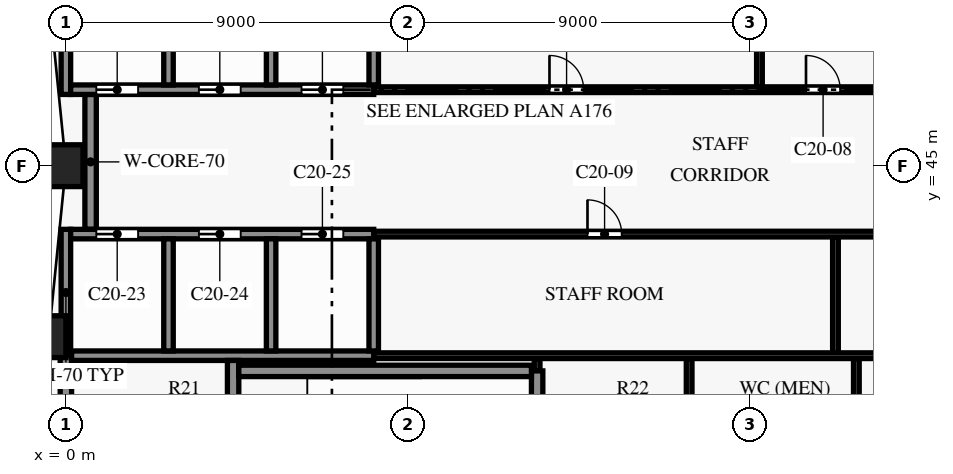
"""IFC4 building model, lengths in metres.
Left out: names, types, materials, properties, quantities, classifications, styles, units other than length and angle.
Written with IfcOpenShell. Run it as: python <this file> out.ifc"""

import sys

from ifc_helpers import new_model, si_unit, direction, frame, frame_2d, origin, origin_2d, place, context, subcontext, project, spatial, rectangle, extrude, element, fill, save


model = new_model("IFC4")
c1 = context("Model", 3, precision=1e-05, world=origin(), true_north=direction((0.0, 1.0)))
c2 = subcontext(c1, "Body", "Model", "MODEL_VIEW")
j1 = project(units=[si_unit("LENGTHUNIT", "METRE"), si_unit("PLANEANGLEUNIT", "RADIAN")], contexts=[c1])
p1 = place(None, origin())
s1 = spatial("IfcSite", under=j1, at=p1, CompositionType="ELEMENT")
p2 = place(p1, origin())
s2 = spatial("IfcBuilding", under=s1, at=p2, CompositionType="ELEMENT")
p3 = place(p2, frame((0.0, 0.0, 143.4)))
s3 = spatial("IfcBuildingStorey", under=s2, at=p3, CompositionType="ELEMENT", Elevation=143.4)
for number, where, z_axis, x_axis in (
    (1, (0.0, 45.0, 0.0), (0.0, 0.0, 1.0), (0.0, -1.0, 0.0)),
    (2, (-0.45, 40.5, 0.0), (0.0, 0.0, 1.0), (-0.1, -0.995, 0.0)),
):
    element("IfcColumn", number, at=place(p3, frame(where, z_axis=z_axis, x_axis=x_axis)), inside=s3, PredefinedType="COLUMN", context=c2, shape_type="SweptSolid", body=[
        extrude(rectangle(XDim=0.9, YDim=1.1, at=origin_2d()), origin(), (0.0, 0.0, 1.0), 3.8),
    ])
p4 = place(p3, frame((4.55, 39.6, 0.0), z_axis=(0.0, 0.0, 1.0), x_axis=(1.0, 0.0, 0.0)))
e3 = element("IfcWall", 3, at=p4, inside=s3, PredefinedType="SHEAR", context=c2, shape_type="SweptSolid", body=[
    extrude(rectangle(XDim=7.7, YDim=0.3, at=frame_2d((3.85, 0.0))), origin(), (0.0, 0.0, 1.0), 3.5),
])
p5 = place(p3, frame((8.1, 40.0, 0.0), z_axis=(0.0, 0.0, 1.0), x_axis=(1.0, 0.0, 0.0)))
e4 = element("IfcWall", 4, at=p5, inside=s3, PredefinedType="PARTITIONING", context=c2, shape_type="SweptSolid", body=[
    extrude(rectangle(XDim=16.125, YDim=0.15, at=frame_2d((8.062, 0.0))), origin(), (0.0, 0.0, 1.0), 3.5),
])
p6 = place(p3, frame((0.15, 40.0, 0.0), z_axis=(0.0, 0.0, 1.0), x_axis=(1.0, 0.0, 0.0)))
e5 = element("IfcWall", 5, at=p6, inside=s3, PredefinedType="SHEAR", context=c2, shape_type="SweptSolid", body=[
    extrude(rectangle(XDim=7.95, YDim=0.25, at=frame_2d((3.975, 0.0))), origin(), (0.0, 0.0, 1.0), 3.5),
])
p7 = place(p3, frame((8.1, 43.2, 0.0), z_axis=(0.0, 0.0, 1.0), x_axis=(1.0, 0.0, 0.0)))
e6 = element("IfcWall", 6, at=p7, inside=s3, PredefinedType="PARTITIONING", context=c2, shape_type="SweptSolid", body=[
    extrude(rectangle(XDim=16.125, YDim=0.15, at=frame_2d((8.062, 0.0))), origin(), (0.0, 0.0, 1.0), 3.5),
])
p8 = place(p7, frame((5.625, 0.0, 0.0)))
e7 = element("IfcOpeningElement", 7, at=p8, cuts=e6, PredefinedType="OPENING", context=c2, shape_type="SweptSolid", body=[
    extrude(rectangle(XDim=0.9, YDim=2.1, at=frame_2d((0.45, 1.05))), frame((0.0, 0.085, 0.0), z_axis=(0.0, -1.0, 0.0), x_axis=(1.0, 0.0, 0.0)), (0.0, 0.0, 1.0), 0.17),
])
p9 = place(p7, frame((13.725, 0.0, 0.0)))
e8 = element("IfcOpeningElement", 8, at=p9, cuts=e6, PredefinedType="OPENING", context=c2, shape_type="SweptSolid", body=[
    extrude(rectangle(XDim=0.9, YDim=2.1, at=frame_2d((0.45, 1.05))), frame((0.0, 0.085, 0.0), z_axis=(0.0, -1.0, 0.0), x_axis=(1.0, 0.0, 0.0)), (0.0, 0.0, 1.0), 0.17),
])
p10 = place(p3, frame((0.125, 43.2, 0.0), z_axis=(0.0, 0.0, 1.0), x_axis=(1.0, 0.0, 0.0)))
e9 = element("IfcWall", 9, at=p10, inside=s3, PredefinedType="SHEAR", context=c2, shape_type="SweptSolid", body=[
    extrude(rectangle(XDim=7.975, YDim=0.25, at=frame_2d((3.988, 0.0))), origin(), (0.0, 0.0, 1.0), 3.5),
])
p11 = place(p10, frame((0.675, 0.0, 0.0)))
e10 = element("IfcOpeningElement", 10, at=p11, cuts=e9, PredefinedType="OPENING", context=c2, shape_type="SweptSolid", body=[
    extrude(rectangle(XDim=1.1, YDim=2.1, at=frame_2d((0.55, 1.05))), frame((0.0, 0.135, 0.0), z_axis=(0.0, -1.0, 0.0), x_axis=(1.0, 0.0, 0.0)), (0.0, 0.0, 1.0), 0.27),
])
p12 = place(p10, frame((3.375, 0.0, 0.0)))
e11 = element("IfcOpeningElement", 11, at=p12, cuts=e9, PredefinedType="OPENING", context=c2, shape_type="SweptSolid", body=[
    extrude(rectangle(XDim=1.1, YDim=2.1, at=frame_2d((0.55, 1.05))), frame((0.0, 0.135, 0.0), z_axis=(0.0, -1.0, 0.0), x_axis=(1.0, 0.0, 0.0)), (0.0, 0.0, 1.0), 0.27),
])
p13 = place(p10, frame((6.075, 0.0, 0.0)))
e12 = element("IfcOpeningElement", 12, at=p13, cuts=e9, PredefinedType="OPENING", context=c2, shape_type="SweptSolid", body=[
    extrude(rectangle(XDim=1.1, YDim=2.1, at=frame_2d((0.55, 1.05))), frame((0.0, 0.135, 0.0), z_axis=(0.0, -1.0, 0.0), x_axis=(1.0, 0.0, 0.0)), (0.0, 0.0, 1.0), 0.27),
])
p14 = place(p3, frame((8.1, 47.0, 0.0), z_axis=(0.0, 0.0, 1.0), x_axis=(1.0, 0.0, 0.0)))
e13 = element("IfcWall", 13, at=p14, inside=s3, PredefinedType="PARTITIONING", context=c2, shape_type="SweptSolid", body=[
    extrude(rectangle(XDim=13.5, YDim=0.15, at=frame_2d((6.75, 0.0))), origin(), (0.0, 0.0, 1.0), 3.5),
])
p15 = place(p14, frame((4.625, 0.0, 0.0)))
e14 = element("IfcOpeningElement", 14, at=p15, cuts=e13, PredefinedType="OPENING", context=c2, shape_type="SweptSolid", body=[
    extrude(rectangle(XDim=0.9, YDim=2.1, at=frame_2d((0.45, 1.05))), frame((0.0, 0.085, 0.0), z_axis=(0.0, -1.0, 0.0), x_axis=(1.0, 0.0, 0.0)), (0.0, 0.0, 1.0), 0.17),
])
p16 = place(p14, frame((11.375, 0.0, 0.0)))
e15 = element("IfcOpeningElement", 15, at=p16, cuts=e13, PredefinedType="OPENING", context=c2, shape_type="SweptSolid", body=[
    extrude(rectangle(XDim=0.9, YDim=2.1, at=frame_2d((0.45, 1.05))), frame((0.0, 0.085, 0.0), z_axis=(0.0, -1.0, 0.0), x_axis=(1.0, 0.0, 0.0)), (0.0, 0.0, 1.0), 0.17),
])
p17 = place(p3, frame((0.125, 47.0, 0.0), z_axis=(0.0, 0.0, 1.0), x_axis=(1.0, 0.0, 0.0)))
e16 = element("IfcWall", 16, at=p17, inside=s3, PredefinedType="SHEAR", context=c2, shape_type="SweptSolid", body=[
    extrude(rectangle(XDim=7.975, YDim=0.25, at=frame_2d((3.988, 0.0))), origin(), (0.0, 0.0, 1.0), 3.5),
])
p18 = place(p17, frame((0.675, 0.0, 0.0)))
e17 = element("IfcOpeningElement", 17, at=p18, cuts=e16, PredefinedType="OPENING", context=c2, shape_type="SweptSolid", body=[
    extrude(rectangle(XDim=1.1, YDim=2.1, at=frame_2d((0.55, 1.05))), frame((0.0, 0.135, 0.0), z_axis=(0.0, -1.0, 0.0), x_axis=(1.0, 0.0, 0.0)), (0.0, 0.0, 1.0), 0.27),
])
p19 = place(p17, frame((3.375, 0.0, 0.0)))
e18 = element("IfcOpeningElement", 18, at=p19, cuts=e16, PredefinedType="OPENING", context=c2, shape_type="SweptSolid", body=[
    extrude(rectangle(XDim=1.1, YDim=2.1, at=frame_2d((0.55, 1.05))), frame((0.0, 0.135, 0.0), z_axis=(0.0, -1.0, 0.0), x_axis=(1.0, 0.0, 0.0)), (0.0, 0.0, 1.0), 0.27),
])
p20 = place(p17, frame((6.075, 0.0, 0.0)))
e19 = element("IfcOpeningElement", 19, at=p20, cuts=e16, PredefinedType="OPENING", context=c2, shape_type="SweptSolid", body=[
    extrude(rectangle(XDim=1.1, YDim=2.1, at=frame_2d((0.55, 1.05))), frame((0.0, 0.135, 0.0), z_axis=(0.0, -1.0, 0.0), x_axis=(1.0, 0.0, 0.0)), (0.0, 0.0, 1.0), 0.27),
])
p21 = place(p3, frame((0.0, 35.925, 0.0), z_axis=(0.0, 0.0, 1.0), x_axis=(0.0, 1.0, 0.0)))
e20 = element("IfcWall", 20, at=p21, inside=s3, PredefinedType="SHEAR", context=c2, shape_type="SweptSolid", body=[
    extrude(rectangle(XDim=4.075, YDim=0.3, at=frame_2d((2.038, 0.0))), origin(), (0.0, 0.0, 1.0), 3.5),
])
p22 = place(p3, frame((0.0, 40.0, 0.0), z_axis=(0.0, 0.0, 1.0), x_axis=(0.0, 1.0, 0.0)))
e21 = element("IfcWall", 21, at=p22, inside=s3, PredefinedType="SHEAR", context=c2, shape_type="SweptSolid", body=[
    extrude(rectangle(XDim=3.325, YDim=0.25, at=frame_2d((1.663, 0.0))), origin(), (0.0, 0.0, 1.0), 3.5),
])
p23 = place(p3, frame((0.0, 46.875, 0.0), z_axis=(0.0, 0.0, 1.0), x_axis=(0.0, 1.0, 0.0)))
e22 = element("IfcWall", 22, at=p23, inside=s3, PredefinedType="SHEAR", context=c2, shape_type="SweptSolid", body=[
    extrude(rectangle(XDim=3.475, YDim=0.25, at=frame_2d((1.738, 0.0))), origin(), (0.0, 0.0, 1.0), 3.5),
])
p24 = place(p3, frame((0.65, 43.325, 0.0), z_axis=(0.0, 0.0, 1.0), x_axis=(0.0, 1.0, 0.0)))
e23 = element("IfcWall", 23, at=p24, inside=s3, PredefinedType="SHEAR", context=c2, shape_type="SweptSolid", body=[
    extrude(rectangle(XDim=3.55, YDim=0.3, at=frame_2d((1.775, 0.0))), origin(), (0.0, 0.0, 1.0), 3.5),
])
for number, where, z_axis, x_axis in (
    (24, (2.7, 40.125, 0.0), (0.0, 0.0, 1.0), (0.0, 1.0, 0.0)),
    (25, (2.7, 47.125, 0.0), (0.0, 0.0, 1.0), (0.0, 1.0, 0.0)),
):
    element("IfcWall", number, at=place(p3, frame(where, z_axis=z_axis, x_axis=x_axis)), inside=s3, PredefinedType="SHEAR", context=c2, shape_type="SweptSolid", body=[
        extrude(rectangle(XDim=2.95, YDim=0.25, at=frame_2d((1.475, 0.0))), origin(), (0.0, 0.0, 1.0), 3.5),
    ])
p25 = place(p3, frame((4.4, 36.15, 0.0), z_axis=(0.0, 0.0, 1.0), x_axis=(0.0, 1.0, 0.0)))
e26 = element("IfcWall", 26, at=p25, inside=s3, PredefinedType="SHEAR", context=c2, shape_type="SweptSolid", body=[
    extrude(rectangle(XDim=3.725, YDim=0.3, at=frame_2d((1.863, 0.0))), origin(), (0.0, 0.0, 1.0), 3.5),
])
for number, where, z_axis, x_axis in (
    (27, (5.4, 40.125, 0.0), (0.0, 0.0, 1.0), (0.0, 1.0, 0.0)),
    (28, (5.4, 47.125, 0.0), (0.0, 0.0, 1.0), (0.0, 1.0, 0.0)),
    (29, (8.1, 40.125, 0.0), (0.0, 0.0, 1.0), (0.0, 1.0, 0.0)),
):
    element("IfcWall", number, at=place(p3, frame(where, z_axis=z_axis, x_axis=x_axis)), inside=s3, PredefinedType="SHEAR", context=c2, shape_type="SweptSolid", body=[
        extrude(rectangle(XDim=2.95, YDim=0.25, at=frame_2d((1.475, 0.0))), origin(), (0.0, 0.0, 1.0), 3.5),
    ])
p26 = place(p3, frame((8.1, 47.125, 0.0), z_axis=(0.0, 0.0, 1.0), x_axis=(0.0, 1.0, 0.0)))
e30 = element("IfcWall", 30, at=p26, inside=s3, PredefinedType="SHEAR", context=c2, shape_type="SweptSolid", body=[
    extrude(rectangle(XDim=3.075, YDim=0.25, at=frame_2d((1.538, 0.0))), origin(), (0.0, 0.0, 1.0), 3.5),
])
p27 = place(p3, frame((12.4, 39.6, 0.0), z_axis=(0.0, 0.0, 1.0), x_axis=(0.0, 1.0, 0.0)))
e31 = element("IfcWall", 31, at=p27, inside=s3, PredefinedType="PARTITIONING", context=c2, shape_type="SweptSolid", body=[
    extrude(rectangle(XDim=0.325, YDim=0.15, at=frame_2d((0.163, 0.0))), origin(), (0.0, 0.0, 1.0), 3.5),
])
p28 = place(p3, frame((12.4, 36.15, 0.0), z_axis=(0.0, 0.0, 1.0), x_axis=(0.0, 1.0, 0.0)))
e32 = element("IfcWall", 32, at=p28, inside=s3, PredefinedType="SHEAR", context=c2, shape_type="SweptSolid", body=[
    extrude(rectangle(XDim=3.45, YDim=0.3, at=frame_2d((1.725, 0.0))), origin(), (0.0, 0.0, 1.0), 3.5),
])
p29 = place(p3, frame((16.4, 36.075, 0.0), z_axis=(0.0, 0.0, 1.0), x_axis=(0.0, 1.0, 0.0)))
e33 = element("IfcWall", 33, at=p29, inside=s3, PredefinedType="PARTITIONING", context=c2, shape_type="SweptSolid", body=[
    extrude(rectangle(XDim=3.85, YDim=0.15, at=frame_2d((1.925, 0.0))), origin(), (0.0, 0.0, 1.0), 3.5),
])
p30 = place(p3, frame((18.25, 47.075, 0.0), z_axis=(0.0, 0.0, 1.0), x_axis=(0.0, 1.0, 0.0)))
e34 = element("IfcWall", 34, at=p30, inside=s3, PredefinedType="PARTITIONING", context=c2, shape_type="SweptSolid", body=[
    extrude(rectangle(XDim=4.65, YDim=0.15, at=frame_2d((2.325, 0.0))), origin(), (0.0, 0.0, 1.0), 3.5),
])
p31 = place(p3, frame((20.25, 40.075, 0.0), z_axis=(0.0, 0.0, 1.0), x_axis=(0.0, 1.0, 0.0)))
e35 = element("IfcWall", 35, at=p31, inside=s3, PredefinedType="PARTITIONING", context=c2, shape_type="SweptSolid", body=[
    extrude(rectangle(XDim=3.05, YDim=0.15, at=frame_2d((1.525, 0.0))), origin(), (0.0, 0.0, 1.0), 3.5),
])
p32 = place(p3, frame((20.8, 36.075, 0.0), z_axis=(0.0, 0.0, 1.0), x_axis=(0.0, 1.0, 0.0)))
e36 = element("IfcWall", 36, at=p32, inside=s3, PredefinedType="PARTITIONING", context=c2, shape_type="SweptSolid", body=[
    extrude(rectangle(XDim=3.85, YDim=0.15, at=frame_2d((1.925, 0.0))), origin(), (0.0, 0.0, 1.0), 3.5),
])
p33 = place(p15, origin())
e37 = element("IfcDoor", 37, at=p33, inside=s3, OperationType="SINGLE_SWING_LEFT", PredefinedType="DOOR", context=c2, shape_type="SweptSolid", body=[
    extrude(rectangle(XDim=0.9, YDim=2.1, at=frame_2d((0.45, 1.05))), frame((0.0, 0.025, 0.0), z_axis=(0.0, -1.0, 0.0), x_axis=(1.0, 0.0, 0.0)), (0.0, 0.0, 1.0), 0.05),
])
fill(e14, e37)
p34 = place(p16, origin())
e38 = element("IfcDoor", 38, at=p34, inside=s3, OperationType="SINGLE_SWING_RIGHT", PredefinedType="DOOR", context=c2, shape_type="SweptSolid", body=[
    extrude(rectangle(XDim=0.9, YDim=2.1, at=frame_2d((0.45, 1.05))), frame((0.0, 0.025, 0.0), z_axis=(0.0, -1.0, 0.0), x_axis=(1.0, 0.0, 0.0)), (0.0, 0.0, 1.0), 0.05),
])
fill(e15, e38)
p35 = place(p8, origin())
e39 = element("IfcDoor", 39, at=p35, inside=s3, OperationType="SINGLE_SWING_RIGHT", PredefinedType="DOOR", context=c2, shape_type="SweptSolid", body=[
    extrude(rectangle(XDim=0.9, YDim=2.1, at=frame_2d((0.45, 1.05))), frame((0.0, 0.025, 0.0), z_axis=(0.0, -1.0, 0.0), x_axis=(1.0, 0.0, 0.0)), (0.0, 0.0, 1.0), 0.05),
])
fill(e7, e39)
p36 = place(p11, origin())
e40 = element("IfcDoor", 40, at=p36, inside=s3, OperationType="DOUBLE_DOOR_SLIDING", PredefinedType="DOOR", context=c2, shape_type="SweptSolid", body=[
    extrude(rectangle(XDim=1.1, YDim=2.1, at=frame_2d((0.55, 1.05))), frame((0.0, 0.025, 0.0), z_axis=(0.0, -1.0, 0.0), x_axis=(1.0, 0.0, 0.0)), (0.0, 0.0, 1.0), 0.05),
])
fill(e10, e40)
p37 = place(p12, origin())
e41 = element("IfcDoor", 41, at=p37, inside=s3, OperationType="DOUBLE_DOOR_SLIDING", PredefinedType="DOOR", context=c2, shape_type="SweptSolid", body=[
    extrude(rectangle(XDim=1.1, YDim=2.1, at=frame_2d((0.55, 1.05))), frame((0.0, 0.025, 0.0), z_axis=(0.0, -1.0, 0.0), x_axis=(1.0, 0.0, 0.0)), (0.0, 0.0, 1.0), 0.05),
])
fill(e11, e41)
p38 = place(p13, origin())
e42 = element("IfcDoor", 42, at=p38, inside=s3, OperationType="DOUBLE_DOOR_SLIDING", PredefinedType="DOOR", context=c2, shape_type="SweptSolid", body=[
    extrude(rectangle(XDim=1.1, YDim=2.1, at=frame_2d((0.55, 1.05))), frame((0.0, 0.025, 0.0), z_axis=(0.0, -1.0, 0.0), x_axis=(1.0, 0.0, 0.0)), (0.0, 0.0, 1.0), 0.05),
])
fill(e12, e42)
p39 = place(p18, origin())
e43 = element("IfcDoor", 43, at=p39, inside=s3, OperationType="DOUBLE_DOOR_SLIDING", PredefinedType="DOOR", context=c2, shape_type="SweptSolid", body=[
    extrude(rectangle(XDim=1.1, YDim=2.1, at=frame_2d((0.55, 1.05))), frame((0.0, 0.025, 0.0), z_axis=(0.0, -1.0, 0.0), x_axis=(1.0, 0.0, 0.0)), (0.0, 0.0, 1.0), 0.05),
])
fill(e17, e43)
p40 = place(p19, origin())
e44 = element("IfcDoor", 44, at=p40, inside=s3, OperationType="DOUBLE_DOOR_SLIDING", PredefinedType="DOOR", context=c2, shape_type="SweptSolid", body=[
    extrude(rectangle(XDim=1.1, YDim=2.1, at=frame_2d((0.55, 1.05))), frame((0.0, 0.025, 0.0), z_axis=(0.0, -1.0, 0.0), x_axis=(1.0, 0.0, 0.0)), (0.0, 0.0, 1.0), 0.05),
])
fill(e18, e44)
p41 = place(p20, origin())
e45 = element("IfcDoor", 45, at=p41, inside=s3, OperationType="DOUBLE_DOOR_SLIDING", PredefinedType="DOOR", context=c2, shape_type="SweptSolid", body=[
    extrude(rectangle(XDim=1.1, YDim=2.1, at=frame_2d((0.55, 1.05))), frame((0.0, 0.025, 0.0), z_axis=(0.0, -1.0, 0.0), x_axis=(1.0, 0.0, 0.0)), (0.0, 0.0, 1.0), 0.05),
])
fill(e19, e45)
save(model, sys.argv[1])
